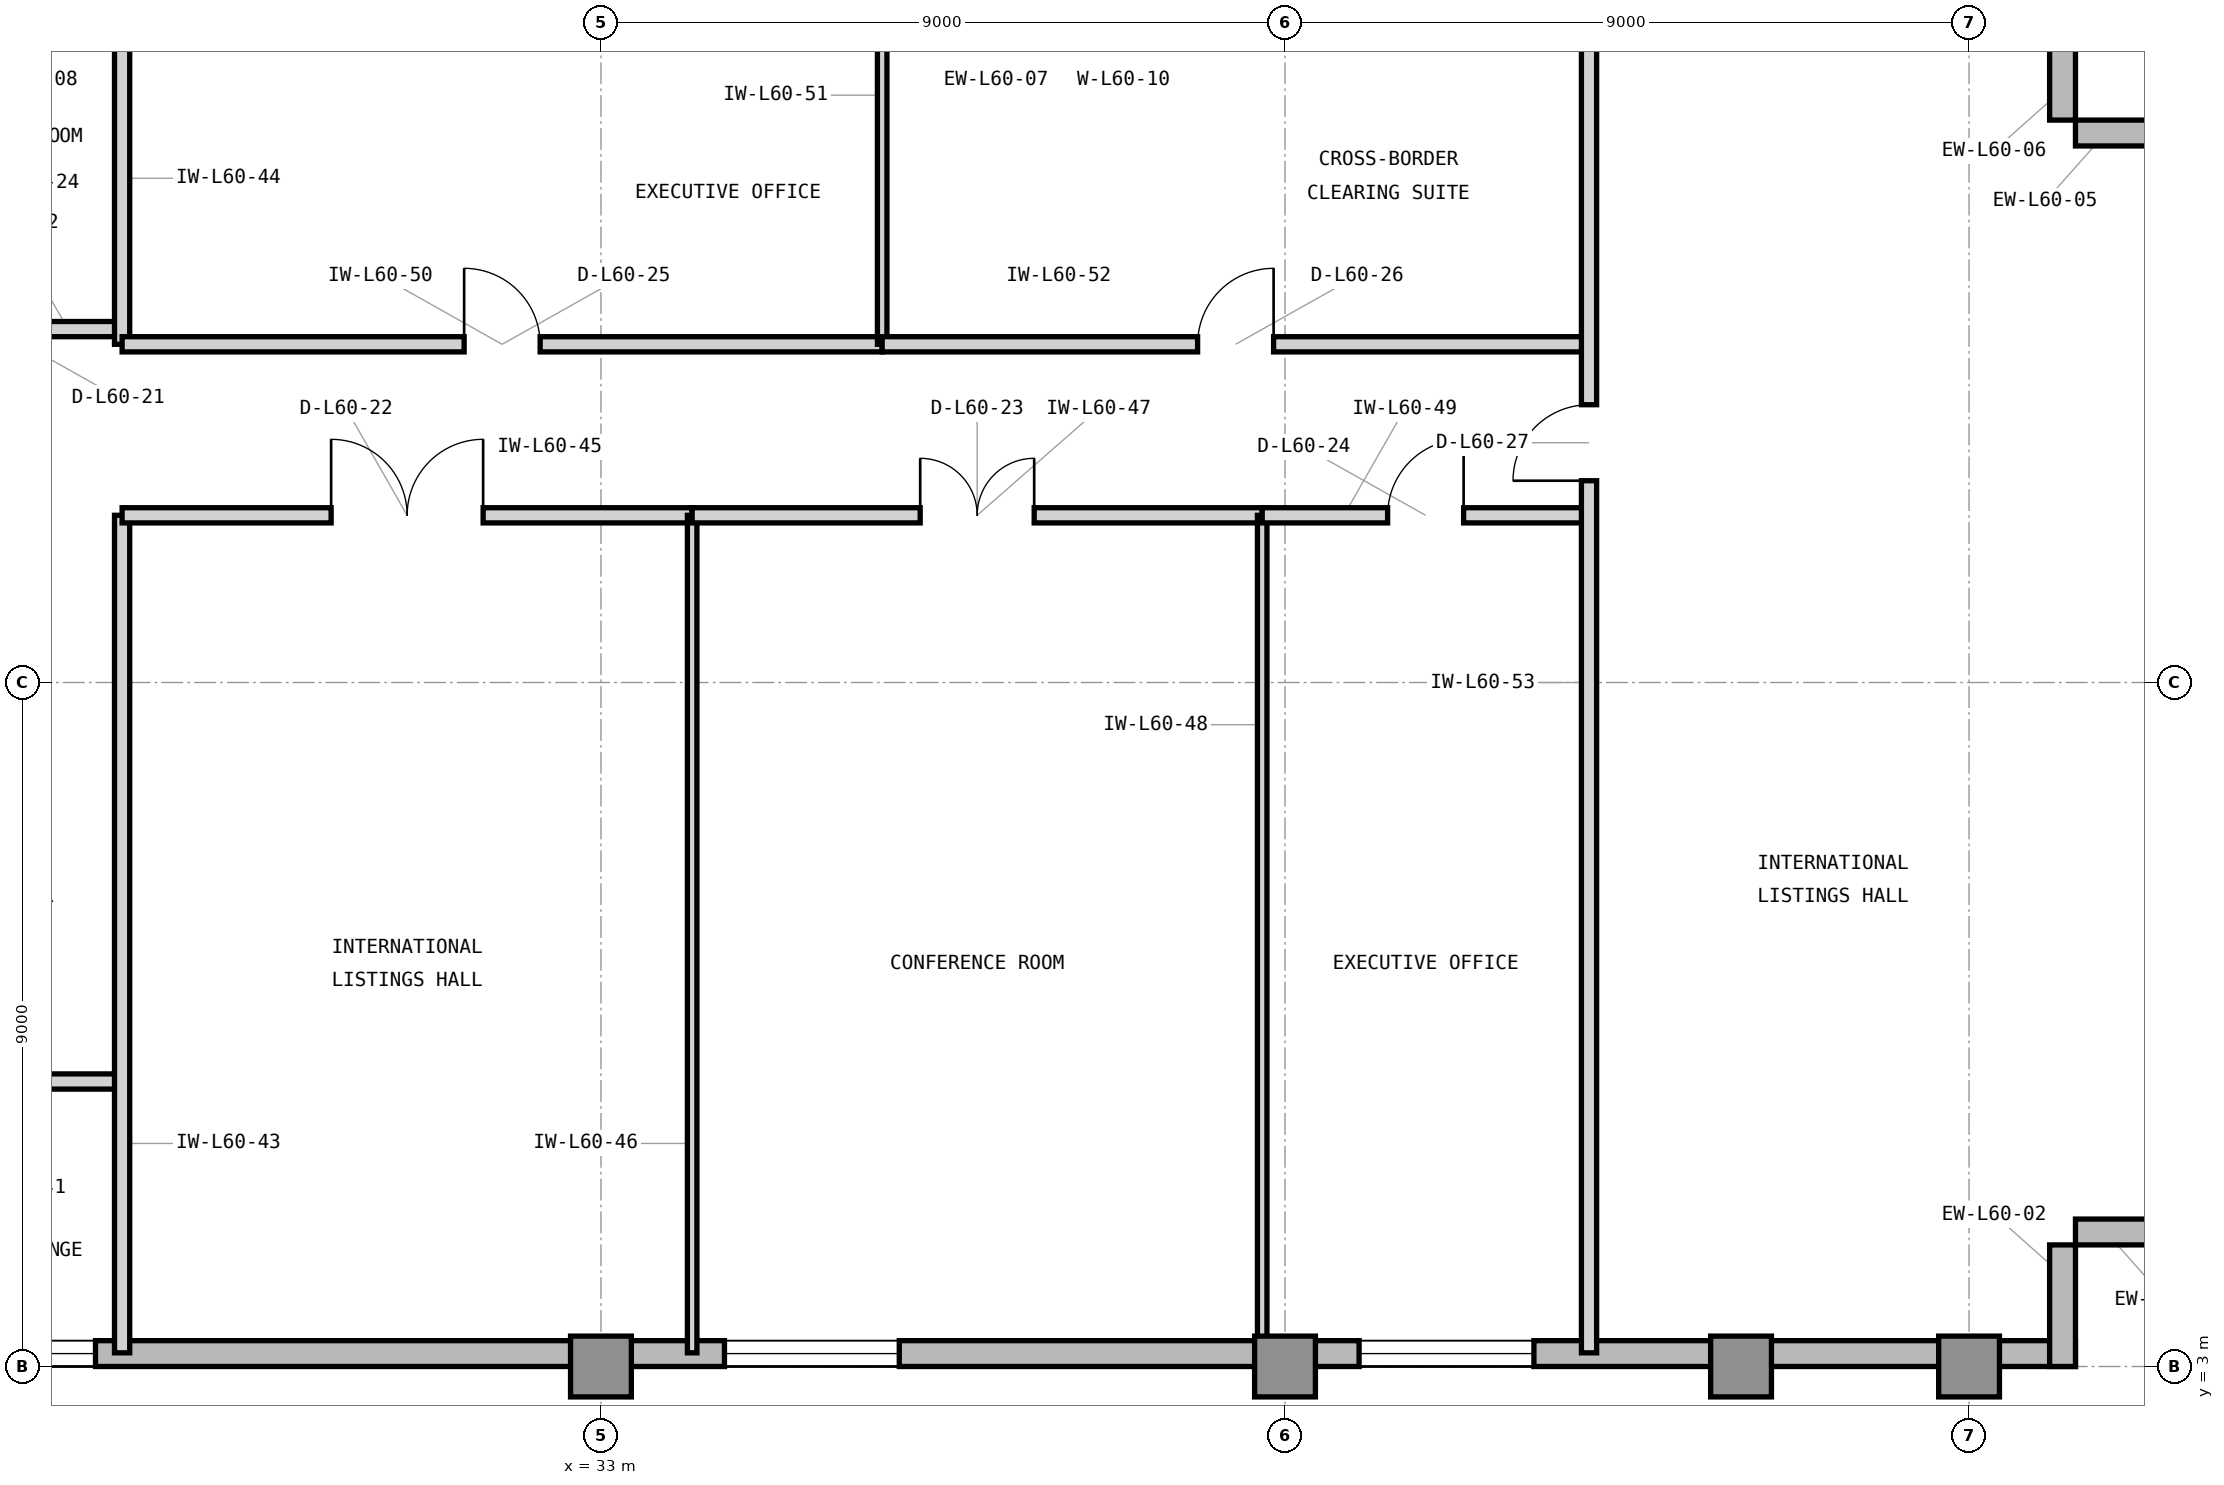
"""IFC4 building model, lengths in metres.
Left out: names, types, materials, properties, quantities, classifications, styles, units other than length and angle.
Written with IfcOpenShell. Run it as: python <this file> out.ifc"""

import sys

from ifc_helpers import new_model, si_unit, direction, frame, frame_2d, origin, origin_2d, place, context, subcontext, project, spatial, rectangle, extrude, element, fill, save


model = new_model("IFC4")
c1 = context("Model", 3, precision=1e-05, world=origin(), true_north=direction((0.0, 1.0)))
c2 = subcontext(c1, "Body", "Model", "MODEL_VIEW")
j1 = project(units=[si_unit("LENGTHUNIT", "METRE"), si_unit("PLANEANGLEUNIT", "RADIAN")], contexts=[c1])
p1 = place(None, origin())
s1 = spatial("IfcSite", under=j1, at=p1, CompositionType="ELEMENT")
p2 = place(p1, origin())
s2 = spatial("IfcBuilding", under=s1, at=p2, CompositionType="ELEMENT")
p3 = place(p2, frame((0.0, 0.0, 246.9)))
s3 = spatial("IfcBuildingStorey", under=s2, at=p3, CompositionType="ELEMENT", Elevation=246.9)
for number, where, z_axis, x_axis in (
    (1, (33.0, 3.0, 0.0), (0.0, 0.0, 1.0), (1.0, 0.0, 0.0)),
    (2, (42.0, 3.0, 0.0), (0.0, 0.0, 1.0), (1.0, 0.0, 0.0)),
    (3, (48.0, 3.0, 0.0), (0.0, 0.0, 1.0), (1.0, 0.0, 0.0)),
    (4, (51.0, 3.0, 0.0), (0.0, 0.0, 1.0), (1.0, 0.0, 0.0)),
):
    element("IfcColumn", number, at=place(p3, frame(where, z_axis=z_axis, x_axis=x_axis)), inside=s3, PredefinedType="COLUMN", context=c2, shape_type="SweptSolid", body=[
        extrude(rectangle(XDim=0.8, YDim=0.8, at=origin_2d()), origin(), (0.0, 0.0, 1.0), 3.9),
    ])
p4 = place(p3, frame((23.9, 3.17, 0.0), z_axis=(0.0, 0.0, 1.0), x_axis=(1.0, 0.0, 0.0)))
e5 = element("IfcWall", 5, at=p4, inside=s3, PredefinedType="STANDARD", context=c2, shape_type="SweptSolid", body=[
    extrude(rectangle(XDim=28.5, YDim=0.34, at=frame_2d((14.25, 0.0))), origin(), (0.0, 0.0, 1.0), 3.7),
])
p5 = place(p4, frame((10.725, 0.0, 0.9)))
e6 = element("IfcOpeningElement", 6, at=p5, cuts=e5, PredefinedType="OPENING", context=c2, shape_type="SweptSolid", body=[
    extrude(rectangle(XDim=2.3, YDim=2.2, at=frame_2d((1.15, 1.1))), frame((0.0, 0.18, 0.0), z_axis=(0.0, -1.0, 0.0), x_axis=(1.0, 0.0, 0.0)), (0.0, 0.0, 1.0), 0.36),
])
p6 = place(p4, frame((0.85, 0.0, 0.9)))
e7 = element("IfcOpeningElement", 7, at=p6, cuts=e5, PredefinedType="OPENING", context=c2, shape_type="SweptSolid", body=[
    extrude(rectangle(XDim=1.6, YDim=2.2, at=frame_2d((0.8, 1.1))), frame((0.0, 0.18, 0.0), z_axis=(0.0, -1.0, 0.0), x_axis=(1.0, 0.0, 0.0)), (0.0, 0.0, 1.0), 0.36),
])
p7 = place(p4, frame((19.075, 0.0, 0.9)))
e8 = element("IfcOpeningElement", 8, at=p7, cuts=e5, PredefinedType="OPENING", context=c2, shape_type="SweptSolid", body=[
    extrude(rectangle(XDim=2.3, YDim=2.2, at=frame_2d((1.15, 1.1))), frame((0.0, 0.18, 0.0), z_axis=(0.0, -1.0, 0.0), x_axis=(1.0, 0.0, 0.0)), (0.0, 0.0, 1.0), 0.36),
])
for number, where, z_axis, x_axis in (
    (9, (52.23, 3.0, 0.0), (0.0, 0.0, 1.0), (0.0, 1.0, 0.0)),
    (10, (52.4, 4.77, 0.0), (0.0, 0.0, 1.0), (1.0, 0.0, 0.0)),
    (11, (54.0, 19.23, 0.0), (0.0, 0.0, 1.0), (-1.0, 0.0, 0.0)),
    (12, (52.23, 19.4, 0.0), (0.0, 0.0, 1.0), (0.0, 1.0, 0.0)),
):
    element("IfcWall", number, at=place(p3, frame(where, z_axis=z_axis, x_axis=x_axis)), inside=s3, PredefinedType="STANDARD", context=c2, shape_type="SweptSolid", body=[
        extrude(rectangle(XDim=1.6, YDim=0.34, at=frame_2d((0.8, 0.0))), origin(), (0.0, 0.0, 1.0), 3.7),
    ])
p8 = place(p3, frame((23.85, 6.75, 0.0), z_axis=(0.0, 0.0, 1.0), x_axis=(1.0, 0.0, 0.0)))
e13 = element("IfcWall", 13, at=p8, inside=s3, PredefinedType="PARTITIONING", context=c2, shape_type="SweptSolid", body=[
    extrude(rectangle(XDim=2.85, YDim=0.2, at=frame_2d((1.425, 0.0))), origin(), (0.0, 0.0, 1.0), 3.69),
])
p9 = place(p8, frame((0.7, 0.0, 0.0)))
e14 = element("IfcOpeningElement", 14, at=p9, cuts=e13, PredefinedType="OPENING", context=c2, shape_type="SweptSolid", body=[
    extrude(rectangle(XDim=1.0, YDim=2.15, at=frame_2d((0.5, 1.075))), frame((0.0, 0.11, 0.0), z_axis=(0.0, -1.0, 0.0), x_axis=(1.0, 0.0, 0.0)), (0.0, 0.0, 1.0), 0.22),
])
p10 = place(p3, frame((23.85, 16.65, 0.0), z_axis=(0.0, 0.0, 1.0), x_axis=(1.0, 0.0, 0.0)))
e15 = element("IfcWall", 15, at=p10, inside=s3, PredefinedType="PARTITIONING", context=c2, shape_type="SweptSolid", body=[
    extrude(rectangle(XDim=2.85, YDim=0.2, at=frame_2d((1.425, 0.0))), origin(), (0.0, 0.0, 1.0), 3.69),
])
p11 = place(p10, frame((0.7, 0.0, 0.0)))
e16 = element("IfcOpeningElement", 16, at=p11, cuts=e15, PredefinedType="OPENING", context=c2, shape_type="SweptSolid", body=[
    extrude(rectangle(XDim=1.0, YDim=2.15, at=frame_2d((0.5, 1.075))), frame((0.0, 0.11, 0.0), z_axis=(0.0, -1.0, 0.0), x_axis=(1.0, 0.0, 0.0)), (0.0, 0.0, 1.0), 0.22),
])
p12 = place(p3, frame((26.7, 3.18, 0.0), z_axis=(0.0, 0.0, 1.0), x_axis=(0.0, 1.0, 0.0)))
e17 = element("IfcWall", 17, at=p12, inside=s3, PredefinedType="PARTITIONING", context=c2, shape_type="SweptSolid", body=[
    extrude(rectangle(XDim=11.02, YDim=0.2, at=frame_2d((5.51, 0.0))), origin(), (0.0, 0.0, 1.0), 3.69),
])
p13 = place(p3, frame((26.7, 16.45, 0.0), z_axis=(0.0, 0.0, 1.0), x_axis=(0.0, 1.0, 0.0)))
e18 = element("IfcWall", 18, at=p13, inside=s3, PredefinedType="PARTITIONING", context=c2, shape_type="SweptSolid", body=[
    extrude(rectangle(XDim=4.37, YDim=0.2, at=frame_2d((2.185, 0.0))), origin(), (0.0, 0.0, 1.0), 3.69),
])
p14 = place(p3, frame((26.7, 14.2, 0.0), z_axis=(0.0, 0.0, 1.0), x_axis=(1.0, 0.0, 0.0)))
e19 = element("IfcWall", 19, at=p14, inside=s3, PredefinedType="PARTITIONING", context=c2, shape_type="SweptSolid", body=[
    extrude(rectangle(XDim=7.5, YDim=0.2, at=frame_2d((3.75, 0.0))), origin(), (0.0, 0.0, 1.0), 3.69),
])
p15 = place(p14, frame((2.75, 0.0, 0.0)))
e20 = element("IfcOpeningElement", 20, at=p15, cuts=e19, PredefinedType="OPENING", context=c2, shape_type="SweptSolid", body=[
    extrude(rectangle(XDim=2.0, YDim=2.5, at=frame_2d((1.0, 1.25))), frame((0.0, 0.11, 0.0), z_axis=(0.0, -1.0, 0.0), x_axis=(1.0, 0.0, 0.0)), (0.0, 0.0, 1.0), 0.22),
])
p16 = place(p3, frame((34.2, 3.18, 0.0), z_axis=(0.0, 0.0, 1.0), x_axis=(0.0, 1.0, 0.0)))
e21 = element("IfcWall", 21, at=p16, inside=s3, PredefinedType="PARTITIONING", context=c2, shape_type="SweptSolid", body=[
    extrude(rectangle(XDim=11.02, YDim=0.125, at=frame_2d((5.51, 0.0))), origin(), (0.0, 0.0, 1.0), 3.69),
])
p17 = place(p3, frame((34.2, 14.2, 0.0), z_axis=(0.0, 0.0, 1.0), x_axis=(1.0, 0.0, 0.0)))
e22 = element("IfcWall", 22, at=p17, inside=s3, PredefinedType="PARTITIONING", context=c2, shape_type="SweptSolid", body=[
    extrude(rectangle(XDim=7.5, YDim=0.2, at=frame_2d((3.75, 0.0))), origin(), (0.0, 0.0, 1.0), 3.69),
])
p18 = place(p17, frame((3.0, 0.0, 0.0)))
e23 = element("IfcOpeningElement", 23, at=p18, cuts=e22, PredefinedType="OPENING", context=c2, shape_type="SweptSolid", body=[
    extrude(rectangle(XDim=1.5, YDim=2.3, at=frame_2d((0.75, 1.15))), frame((0.0, 0.11, 0.0), z_axis=(0.0, -1.0, 0.0), x_axis=(1.0, 0.0, 0.0)), (0.0, 0.0, 1.0), 0.22),
])
p19 = place(p3, frame((41.7, 3.18, 0.0), z_axis=(0.0, 0.0, 1.0), x_axis=(0.0, 1.0, 0.0)))
e24 = element("IfcWall", 24, at=p19, inside=s3, PredefinedType="PARTITIONING", context=c2, shape_type="SweptSolid", body=[
    extrude(rectangle(XDim=11.02, YDim=0.125, at=frame_2d((5.51, 0.0))), origin(), (0.0, 0.0, 1.0), 3.69),
])
p20 = place(p3, frame((41.7, 14.2, 0.0), z_axis=(0.0, 0.0, 1.0), x_axis=(1.0, 0.0, 0.0)))
e25 = element("IfcWall", 25, at=p20, inside=s3, PredefinedType="PARTITIONING", context=c2, shape_type="SweptSolid", body=[
    extrude(rectangle(XDim=4.3, YDim=0.2, at=frame_2d((2.15, 0.0))), origin(), (0.0, 0.0, 1.0), 3.69),
])
p21 = place(p20, frame((1.65, 0.0, 0.0)))
e26 = element("IfcOpeningElement", 26, at=p21, cuts=e25, PredefinedType="OPENING", context=c2, shape_type="SweptSolid", body=[
    extrude(rectangle(XDim=1.0, YDim=2.15, at=frame_2d((0.5, 1.075))), frame((0.0, 0.11, 0.0), z_axis=(0.0, -1.0, 0.0), x_axis=(1.0, 0.0, 0.0)), (0.0, 0.0, 1.0), 0.22),
])
p22 = place(p3, frame((26.7, 16.45, 0.0), z_axis=(0.0, 0.0, 1.0), x_axis=(1.0, 0.0, 0.0)))
e27 = element("IfcWall", 27, at=p22, inside=s3, PredefinedType="PARTITIONING", context=c2, shape_type="SweptSolid", body=[
    extrude(rectangle(XDim=10.0, YDim=0.2, at=frame_2d((5.0, 0.0))), origin(), (0.0, 0.0, 1.0), 3.69),
])
p23 = place(p22, frame((4.5, 0.0, 0.0)))
e28 = element("IfcOpeningElement", 28, at=p23, cuts=e27, PredefinedType="OPENING", context=c2, shape_type="SweptSolid", body=[
    extrude(rectangle(XDim=1.0, YDim=2.15, at=frame_2d((0.5, 1.075))), frame((0.0, 0.11, 0.0), z_axis=(0.0, -1.0, 0.0), x_axis=(1.0, 0.0, 0.0)), (0.0, 0.0, 1.0), 0.22),
])
p24 = place(p3, frame((36.7, 16.45, 0.0), z_axis=(0.0, 0.0, 1.0), x_axis=(0.0, 1.0, 0.0)))
e29 = element("IfcWall", 29, at=p24, inside=s3, PredefinedType="PARTITIONING", context=c2, shape_type="SweptSolid", body=[
    extrude(rectangle(XDim=4.37, YDim=0.125, at=frame_2d((2.185, 0.0))), origin(), (0.0, 0.0, 1.0), 3.69),
])
p25 = place(p3, frame((36.7, 16.45, 0.0), z_axis=(0.0, 0.0, 1.0), x_axis=(1.0, 0.0, 0.0)))
e30 = element("IfcWall", 30, at=p25, inside=s3, PredefinedType="PARTITIONING", context=c2, shape_type="SweptSolid", body=[
    extrude(rectangle(XDim=9.3, YDim=0.2, at=frame_2d((4.65, 0.0))), origin(), (0.0, 0.0, 1.0), 3.69),
])
p26 = place(p25, frame((4.15, 0.0, 0.0)))
e31 = element("IfcOpeningElement", 31, at=p26, cuts=e30, PredefinedType="OPENING", context=c2, shape_type="SweptSolid", body=[
    extrude(rectangle(XDim=1.0, YDim=2.15, at=frame_2d((0.5, 1.075))), frame((0.0, 0.11, 0.0), z_axis=(0.0, -1.0, 0.0), x_axis=(1.0, 0.0, 0.0)), (0.0, 0.0, 1.0), 0.22),
])
p27 = place(p3, frame((46.0, 3.18, 0.0), z_axis=(0.0, 0.0, 1.0), x_axis=(0.0, 1.0, 0.0)))
e32 = element("IfcWall", 32, at=p27, inside=s3, PredefinedType="PARTITIONING", context=c2, shape_type="SweptSolid", body=[
    extrude(rectangle(XDim=17.64, YDim=0.2, at=frame_2d((8.82, 0.0))), origin(), (0.0, 0.0, 1.0), 3.69),
])
p28 = place(p27, frame((11.475, 0.0, 0.0)))
e33 = element("IfcOpeningElement", 33, at=p28, cuts=e32, PredefinedType="OPENING", context=c2, shape_type="SweptSolid", body=[
    extrude(rectangle(XDim=1.0, YDim=2.15, at=frame_2d((0.5, 1.075))), frame((0.0, 0.11, 0.0), z_axis=(0.0, -1.0, 0.0), x_axis=(1.0, 0.0, 0.0)), (0.0, 0.0, 1.0), 0.22),
])
p29 = place(p5, origin())
e34 = element("IfcWindow", 34, at=p29, inside=s3, PartitioningType="SINGLE_PANEL", PredefinedType="WINDOW", context=c2, shape_type="SweptSolid", body=[
    extrude(rectangle(XDim=2.3, YDim=2.2, at=frame_2d((1.15, 1.1))), frame((0.0, 0.11, 0.0), z_axis=(0.0, -1.0, 0.0), x_axis=(1.0, 0.0, 0.0)), (0.0, 0.0, 1.0), 0.06),
])
fill(e6, e34)
p30 = place(p15, origin())
e35 = element("IfcDoor", 35, at=p30, inside=s3, OperationType="DOUBLE_DOOR_SINGLE_SWING", PredefinedType="DOOR", context=c2, shape_type="SweptSolid", body=[
    extrude(rectangle(XDim=2.0, YDim=2.5, at=frame_2d((1.0, 1.25))), frame((0.0, 0.025, 0.0), z_axis=(0.0, -1.0, 0.0), x_axis=(1.0, 0.0, 0.0)), (0.0, 0.0, 1.0), 0.05),
])
fill(e20, e35)
p31 = place(p18, origin())
e36 = element("IfcDoor", 36, at=p31, inside=s3, OperationType="DOUBLE_DOOR_SINGLE_SWING", PredefinedType="DOOR", context=c2, shape_type="SweptSolid", body=[
    extrude(rectangle(XDim=1.5, YDim=2.3, at=frame_2d((0.75, 1.15))), frame((0.0, 0.025, 0.0), z_axis=(0.0, -1.0, 0.0), x_axis=(1.0, 0.0, 0.0)), (0.0, 0.0, 1.0), 0.05),
])
fill(e23, e36)
p32 = place(p21, origin())
e37 = element("IfcDoor", 37, at=p32, inside=s3, OperationType="SINGLE_SWING_RIGHT", PredefinedType="DOOR", context=c2, shape_type="SweptSolid", body=[
    extrude(rectangle(XDim=1.0, YDim=2.15, at=frame_2d((0.5, 1.075))), frame((0.0, 0.025, 0.0), z_axis=(0.0, -1.0, 0.0), x_axis=(1.0, 0.0, 0.0)), (0.0, 0.0, 1.0), 0.05),
])
fill(e26, e37)
p33 = place(p23, origin())
e38 = element("IfcDoor", 38, at=p33, inside=s3, OperationType="SINGLE_SWING_LEFT", PredefinedType="DOOR", context=c2, shape_type="SweptSolid", body=[
    extrude(rectangle(XDim=1.0, YDim=2.15, at=frame_2d((0.5, 1.075))), frame((0.0, 0.025, 0.0), z_axis=(0.0, -1.0, 0.0), x_axis=(1.0, 0.0, 0.0)), (0.0, 0.0, 1.0), 0.05),
])
fill(e28, e38)
p34 = place(p26, origin())
e39 = element("IfcDoor", 39, at=p34, inside=s3, OperationType="SINGLE_SWING_RIGHT", PredefinedType="DOOR", context=c2, shape_type="SweptSolid", body=[
    extrude(rectangle(XDim=1.0, YDim=2.15, at=frame_2d((0.5, 1.075))), frame((0.0, 0.025, 0.0), z_axis=(0.0, -1.0, 0.0), x_axis=(1.0, 0.0, 0.0)), (0.0, 0.0, 1.0), 0.05),
])
fill(e31, e39)
p35 = place(p28, origin())
e40 = element("IfcDoor", 40, at=p35, inside=s3, OperationType="SINGLE_SWING_LEFT", PredefinedType="DOOR", context=c2, shape_type="SweptSolid", body=[
    extrude(rectangle(XDim=1.0, YDim=2.15, at=frame_2d((0.5, 1.075))), frame((0.0, 0.025, 0.0), z_axis=(0.0, -1.0, 0.0), x_axis=(1.0, 0.0, 0.0)), (0.0, 0.0, 1.0), 0.05),
])
fill(e33, e40)
p36 = place(p6, origin())
e41 = element("IfcWindow", 41, at=p36, inside=s3, PartitioningType="SINGLE_PANEL", PredefinedType="WINDOW", context=c2, shape_type="SweptSolid", body=[
    extrude(rectangle(XDim=1.6, YDim=2.2, at=frame_2d((0.8, 1.1))), frame((0.0, 0.11, 0.0), z_axis=(0.0, -1.0, 0.0), x_axis=(1.0, 0.0, 0.0)), (0.0, 0.0, 1.0), 0.06),
])
fill(e7, e41)
p37 = place(p7, origin())
e42 = element("IfcWindow", 42, at=p37, inside=s3, PartitioningType="SINGLE_PANEL", PredefinedType="WINDOW", context=c2, shape_type="SweptSolid", body=[
    extrude(rectangle(XDim=2.3, YDim=2.2, at=frame_2d((1.15, 1.1))), frame((0.0, 0.11, 0.0), z_axis=(0.0, -1.0, 0.0), x_axis=(1.0, 0.0, 0.0)), (0.0, 0.0, 1.0), 0.06),
])
fill(e8, e42)
save(model, sys.argv[1])
